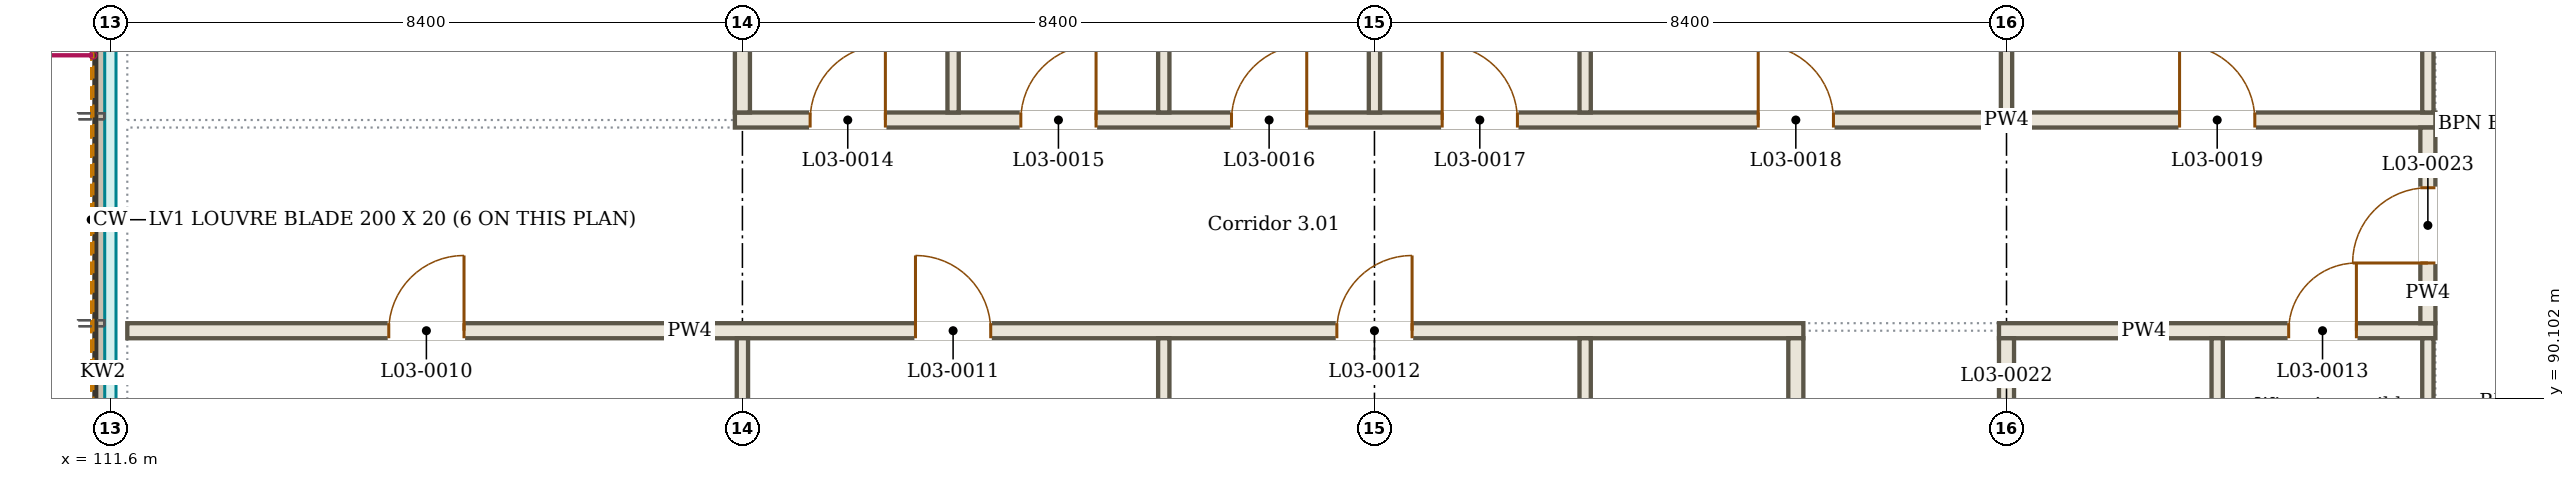
"""IFC4 building model, lengths in metres.
Left out: names, types, materials, properties, quantities, classifications, styles, units other than length and angle.
Written with IfcOpenShell. Run it as: python <this file> out.ifc"""

import sys

from ifc_helpers import new_model, si_unit, direction, frame, frame_2d, origin, place, context, subcontext, project, spatial, rectangle, extrude, element, fill, save


model = new_model("IFC4")
c1 = context("Model", 3, precision=1e-05, world=origin(), true_north=direction((0.0, 1.0)))
c2 = subcontext(c1, "Body", "Model", "MODEL_VIEW")
j1 = project(units=[si_unit("LENGTHUNIT", "METRE"), si_unit("PLANEANGLEUNIT", "RADIAN")], contexts=[c1])
p1 = place(None, origin())
s1 = spatial("IfcSite", under=j1, at=p1, CompositionType="ELEMENT")
p2 = place(p1, origin())
s2 = spatial("IfcBuilding", under=s1, at=p2, CompositionType="ELEMENT")
p3 = place(p2, frame((0.0, 0.0, 13.5)))
s3 = spatial("IfcBuildingStorey", under=s2, at=p3, CompositionType="ELEMENT", Elevation=13.5)
p4 = place(p3, frame((111.44, 88.35, 3.87), z_axis=(0.0, 0.0, 1.0), x_axis=(0.0, 1.0, 0.0)))
e1 = element("IfcWall", 1, at=p4, inside=s3, PredefinedType="SOLIDWALL", context=c2, shape_type="SweptSolid", body=[
    extrude(rectangle(XDim=8.25, YDim=0.13, at=frame_2d((4.125, 0.0))), origin(), (0.0, 0.0, 1.0), 0.63),
])
p5 = place(p3, frame((111.825, 91.0, 0.0), z_axis=(0.0, 0.0, 1.0), x_axis=(1.0, 0.0, 0.0)))
e2 = element("IfcWall", 2, at=p5, inside=s3, PredefinedType="PARTITIONING", context=c2, shape_type="SweptSolid", body=[
    extrude(rectangle(XDim=22.275, YDim=0.2, at=frame_2d((11.138, 0.0))), origin(), (0.0, 0.0, 1.0), 3.8),
])
p6 = place(p5, frame((3.475, 0.0, 0.0)))
e3 = element("IfcOpeningElement", 3, at=p6, cuts=e2, PredefinedType="OPENING", context=c2, shape_type="SweptSolid", body=[
    extrude(rectangle(XDim=1.0, YDim=2.1, at=frame_2d((0.5, 1.05))), frame((0.0, 0.11, 0.0), z_axis=(0.0, -1.0, 0.0), x_axis=(1.0, 0.0, 0.0)), (0.0, 0.0, 1.0), 0.22),
])
p7 = place(p5, frame((10.475, 0.0, 0.0)))
e4 = element("IfcOpeningElement", 4, at=p7, cuts=e2, PredefinedType="OPENING", context=c2, shape_type="SweptSolid", body=[
    extrude(rectangle(XDim=1.0, YDim=2.1, at=frame_2d((0.5, 1.05))), frame((0.0, 0.11, 0.0), z_axis=(0.0, -1.0, 0.0), x_axis=(1.0, 0.0, 0.0)), (0.0, 0.0, 1.0), 0.22),
])
p8 = place(p5, frame((16.075, 0.0, 0.0)))
e5 = element("IfcOpeningElement", 5, at=p8, cuts=e2, PredefinedType="OPENING", context=c2, shape_type="SweptSolid", body=[
    extrude(rectangle(XDim=1.0, YDim=2.1, at=frame_2d((0.5, 1.05))), frame((0.0, 0.11, 0.0), z_axis=(0.0, -1.0, 0.0), x_axis=(1.0, 0.0, 0.0)), (0.0, 0.0, 1.0), 0.22),
])
p9 = place(p3, frame((136.7, 91.0, 0.0), z_axis=(0.0, 0.0, 1.0), x_axis=(1.0, 0.0, 0.0)))
e6 = element("IfcWall", 6, at=p9, inside=s3, PredefinedType="PARTITIONING", context=c2, shape_type="SweptSolid", body=[
    extrude(rectangle(XDim=5.8, YDim=0.2, at=frame_2d((2.9, 0.0))), origin(), (0.0, 0.0, 1.0), 3.8),
])
p10 = place(p9, frame((3.85, 0.0, 0.0)))
e7 = element("IfcOpeningElement", 7, at=p10, cuts=e6, PredefinedType="OPENING", context=c2, shape_type="SweptSolid", body=[
    extrude(rectangle(XDim=0.9, YDim=2.1, at=frame_2d((0.45, 1.05))), frame((0.0, 0.11, 0.0), z_axis=(0.0, -1.0, 0.0), x_axis=(1.0, 0.0, 0.0)), (0.0, 0.0, 1.0), 0.22),
])
p11 = place(p3, frame((119.9, 93.8, 0.0), z_axis=(0.0, 0.0, 1.0), x_axis=(1.0, 0.0, 0.0)))
e8 = element("IfcWall", 8, at=p11, inside=s3, PredefinedType="PARTITIONING", context=c2, shape_type="SweptSolid", body=[
    extrude(rectangle(XDim=22.6, YDim=0.2, at=frame_2d((11.3, 0.0))), origin(), (0.0, 0.0, 1.0), 3.8),
])
p12 = place(p11, frame((1.0, 0.0, 0.0)))
e9 = element("IfcOpeningElement", 9, at=p12, cuts=e8, PredefinedType="OPENING", context=c2, shape_type="SweptSolid", body=[
    extrude(rectangle(XDim=1.0, YDim=2.1, at=frame_2d((0.5, 1.05))), frame((0.0, 0.11, 0.0), z_axis=(0.0, -1.0, 0.0), x_axis=(1.0, 0.0, 0.0)), (0.0, 0.0, 1.0), 0.22),
])
p13 = place(p11, frame((3.8, 0.0, 0.0)))
e10 = element("IfcOpeningElement", 10, at=p13, cuts=e8, PredefinedType="OPENING", context=c2, shape_type="SweptSolid", body=[
    extrude(rectangle(XDim=1.0, YDim=2.1, at=frame_2d((0.5, 1.05))), frame((0.0, 0.11, 0.0), z_axis=(0.0, -1.0, 0.0), x_axis=(1.0, 0.0, 0.0)), (0.0, 0.0, 1.0), 0.22),
])
p14 = place(p11, frame((6.6, 0.0, 0.0)))
e11 = element("IfcOpeningElement", 11, at=p14, cuts=e8, PredefinedType="OPENING", context=c2, shape_type="SweptSolid", body=[
    extrude(rectangle(XDim=1.0, YDim=2.1, at=frame_2d((0.5, 1.05))), frame((0.0, 0.11, 0.0), z_axis=(0.0, -1.0, 0.0), x_axis=(1.0, 0.0, 0.0)), (0.0, 0.0, 1.0), 0.22),
])
p15 = place(p11, frame((9.4, 0.0, 0.0)))
e12 = element("IfcOpeningElement", 12, at=p15, cuts=e8, PredefinedType="OPENING", context=c2, shape_type="SweptSolid", body=[
    extrude(rectangle(XDim=1.0, YDim=2.1, at=frame_2d((0.5, 1.05))), frame((0.0, 0.11, 0.0), z_axis=(0.0, -1.0, 0.0), x_axis=(1.0, 0.0, 0.0)), (0.0, 0.0, 1.0), 0.22),
])
p16 = place(p11, frame((13.6, 0.0, 0.0)))
e13 = element("IfcOpeningElement", 13, at=p16, cuts=e8, PredefinedType="OPENING", context=c2, shape_type="SweptSolid", body=[
    extrude(rectangle(XDim=1.0, YDim=2.1, at=frame_2d((0.5, 1.05))), frame((0.0, 0.11, 0.0), z_axis=(0.0, -1.0, 0.0), x_axis=(1.0, 0.0, 0.0)), (0.0, 0.0, 1.0), 0.22),
])
p17 = place(p11, frame((19.2, 0.0, 0.0)))
e14 = element("IfcOpeningElement", 14, at=p17, cuts=e8, PredefinedType="OPENING", context=c2, shape_type="SweptSolid", body=[
    extrude(rectangle(XDim=1.0, YDim=2.1, at=frame_2d((0.5, 1.05))), frame((0.0, 0.11, 0.0), z_axis=(0.0, -1.0, 0.0), x_axis=(1.0, 0.0, 0.0)), (0.0, 0.0, 1.0), 0.22),
])
p18 = place(p3, frame((120.0, 88.397, 0.0), z_axis=(0.0, 0.0, 1.0), x_axis=(0.0, 1.0, 0.0)))
e15 = element("IfcWall", 15, at=p18, inside=s3, PredefinedType="PARTITIONING", context=c2, shape_type="SweptSolid", body=[
    extrude(rectangle(XDim=2.502, YDim=0.15, at=frame_2d((1.251, 0.0))), origin(), (0.0, 0.0, 1.0), 3.8),
])
p19 = place(p3, frame((120.0, 93.9, 0.0), z_axis=(0.0, 0.0, 1.0), x_axis=(0.0, 1.0, 0.0)))
e16 = element("IfcWall", 16, at=p19, inside=s3, PredefinedType="PARTITIONING", context=c2, shape_type="SweptSolid", body=[
    extrude(rectangle(XDim=2.7, YDim=0.2, at=frame_2d((1.35, 0.0))), origin(), (0.0, 0.0, 1.0), 3.8),
])
for number, where, z_axis, x_axis in (
    (17, (122.8, 93.9, 0.0), (0.0, 0.0, 1.0), (0.0, 1.0, 0.0)),
    (18, (125.6, 80.025, 0.0), (0.0, 0.0, 1.0), (0.0, 1.0, 0.0)),
    (19, (125.6, 93.9, 0.0), (0.0, 0.0, 1.0), (0.0, 1.0, 0.0)),
):
    element("IfcWall", number, at=place(p3, frame(where, z_axis=z_axis, x_axis=x_axis)), inside=s3, PredefinedType="PARTITIONING", context=c2, shape_type="SweptSolid", body=[
        extrude(rectangle(XDim=10.875, YDim=0.15, at=frame_2d((5.438, 0.0))), origin(), (0.0, 0.0, 1.0), 3.8),
    ])
p20 = place(p3, frame((128.4, 93.9, 0.0), z_axis=(0.0, 0.0, 1.0), x_axis=(0.0, 1.0, 0.0)))
e20 = element("IfcWall", 20, at=p20, inside=s3, PredefinedType="PARTITIONING", context=c2, shape_type="SweptSolid", body=[
    extrude(rectangle(XDim=2.503, YDim=0.15, at=frame_2d((1.251, 0.0))), origin(), (0.0, 0.0, 1.0), 3.8),
])
for number, where, z_axis, x_axis in (
    (21, (131.2, 80.025, 0.0), (0.0, 0.0, 1.0), (0.0, 1.0, 0.0)),
    (22, (131.2, 93.9, 0.0), (0.0, 0.0, 1.0), (0.0, 1.0, 0.0)),
):
    element("IfcWall", number, at=place(p3, frame(where, z_axis=z_axis, x_axis=x_axis)), inside=s3, PredefinedType="PARTITIONING", context=c2, shape_type="SweptSolid", body=[
        extrude(rectangle(XDim=10.875, YDim=0.15, at=frame_2d((5.438, 0.0))), origin(), (0.0, 0.0, 1.0), 3.8),
    ])
p21 = place(p3, frame((134.0, 82.3, 0.0), z_axis=(0.0, 0.0, 1.0), x_axis=(0.0, 1.0, 0.0)))
e23 = element("IfcWall", 23, at=p21, inside=s3, PredefinedType="PARTITIONING", context=c2, shape_type="SweptSolid", body=[
    extrude(rectangle(XDim=8.6, YDim=0.2, at=frame_2d((4.3, 0.0))), origin(), (0.0, 0.0, 1.0), 3.8),
])
p22 = place(p21, frame((3.8, 0.0, 0.0)))
e24 = element("IfcOpeningElement", 24, at=p22, cuts=e23, PredefinedType="OPENING", context=c2, shape_type="SweptSolid", body=[
    extrude(rectangle(XDim=1.0, YDim=2.1, at=frame_2d((0.5, 1.05))), frame((0.0, 0.11, 0.0), z_axis=(0.0, -1.0, 0.0), x_axis=(1.0, 0.0, 0.0)), (0.0, 0.0, 1.0), 0.22),
])
p23 = place(p3, frame((136.8, 88.2, 0.0), z_axis=(0.0, 0.0, 1.0), x_axis=(0.0, 1.0, 0.0)))
e25 = element("IfcWall", 25, at=p23, inside=s3, PredefinedType="PARTITIONING", context=c2, shape_type="SweptSolid", body=[
    extrude(rectangle(XDim=2.7, YDim=0.2, at=frame_2d((1.35, 0.0))), origin(), (0.0, 0.0, 1.0), 3.8),
])
p24 = place(p23, frame((0.95, 0.0, 0.0)))
e26 = element("IfcOpeningElement", 26, at=p24, cuts=e25, PredefinedType="OPENING", context=c2, shape_type="SweptSolid", body=[
    extrude(rectangle(XDim=0.9, YDim=2.1, at=frame_2d((0.45, 1.05))), frame((0.0, 0.11, 0.0), z_axis=(0.0, -1.0, 0.0), x_axis=(1.0, 0.0, 0.0)), (0.0, 0.0, 1.0), 0.22),
])
p25 = place(p3, frame((136.8, 93.9, 0.0), z_axis=(0.0, 0.0, 1.0), x_axis=(0.0, 1.0, 0.0)))
e27 = element("IfcWall", 27, at=p25, inside=s3, PredefinedType="PARTITIONING", context=c2, shape_type="SweptSolid", body=[
    extrude(rectangle(XDim=2.503, YDim=0.15, at=frame_2d((1.251, 0.0))), origin(), (0.0, 0.0, 1.0), 3.8),
])
for number, where, z_axis, x_axis in (
    (28, (139.6, 88.2, 0.0), (0.0, 0.0, 1.0), (0.0, 1.0, 0.0)),
    (29, (142.4, 88.2, 0.0), (0.0, 0.0, 1.0), (0.0, 1.0, 0.0)),
):
    element("IfcWall", number, at=place(p3, frame(where, z_axis=z_axis, x_axis=x_axis)), inside=s3, PredefinedType="PARTITIONING", context=c2, shape_type="SweptSolid", body=[
        extrude(rectangle(XDim=2.7, YDim=0.15, at=frame_2d((1.35, 0.0))), origin(), (0.0, 0.0, 1.0), 3.95),
    ])
p26 = place(p3, frame((142.4, 91.1, 0.0), z_axis=(0.0, 0.0, 1.0), x_axis=(0.0, 1.0, 0.0)))
e30 = element("IfcWall", 30, at=p26, inside=s3, PredefinedType="PARTITIONING", context=c2, shape_type="SweptSolid", body=[
    extrude(rectangle(XDim=2.6, YDim=0.2, at=frame_2d((1.3, 0.0))), origin(), (0.0, 0.0, 1.0), 3.95),
])
p27 = place(p26, frame((0.8, 0.0, 0.0)))
e31 = element("IfcOpeningElement", 31, at=p27, cuts=e30, PredefinedType="OPENING", context=c2, shape_type="SweptSolid", body=[
    extrude(rectangle(XDim=1.0, YDim=2.1, at=frame_2d((0.5, 1.05))), frame((0.0, 0.11, 0.0), z_axis=(0.0, -1.0, 0.0), x_axis=(1.0, 0.0, 0.0)), (0.0, 0.0, 1.0), 0.22),
])
p28 = place(p3, frame((142.4, 93.9, 0.0), z_axis=(0.0, 0.0, 1.0), x_axis=(0.0, 1.0, 0.0)))
e32 = element("IfcWall", 32, at=p28, inside=s3, PredefinedType="PARTITIONING", context=c2, shape_type="SweptSolid", body=[
    extrude(rectangle(XDim=10.875, YDim=0.15, at=frame_2d((5.438, 0.0))), origin(), (0.0, 0.0, 1.0), 3.8),
])
p29 = place(p3, frame((111.5, 88.4, 0.0), z_axis=(0.0, 0.0, 1.0), x_axis=(0.0, 1.0, 0.0)))
e33 = element("IfcWall", 33, at=p29, inside=s3, PredefinedType="SOLIDWALL", context=c2, shape_type="SweptSolid", body=[
    extrude(rectangle(XDim=8.2, YDim=0.2, at=frame_2d((4.1, 0.0))), origin(), (0.0, 0.0, 1.0), 3.0),
])
p30 = place(p6, origin())
e34 = element("IfcDoor", 34, at=p30, inside=s3, OperationType="SINGLE_SWING_RIGHT", PredefinedType="DOOR", context=c2, shape_type="SweptSolid", body=[
    extrude(rectangle(XDim=1.0, YDim=2.1, at=frame_2d((0.5, 1.05))), frame((0.0, 0.025, 0.0), z_axis=(0.0, -1.0, 0.0), x_axis=(1.0, 0.0, 0.0)), (0.0, 0.0, 1.0), 0.05),
])
fill(e3, e34)
p31 = place(p7, origin())
e35 = element("IfcDoor", 35, at=p31, inside=s3, OperationType="SINGLE_SWING_LEFT", PredefinedType="DOOR", context=c2, shape_type="SweptSolid", body=[
    extrude(rectangle(XDim=1.0, YDim=2.1, at=frame_2d((0.5, 1.05))), frame((0.0, 0.025, 0.0), z_axis=(0.0, -1.0, 0.0), x_axis=(1.0, 0.0, 0.0)), (0.0, 0.0, 1.0), 0.05),
])
fill(e4, e35)
p32 = place(p8, origin())
e36 = element("IfcDoor", 36, at=p32, inside=s3, OperationType="SINGLE_SWING_RIGHT", PredefinedType="DOOR", context=c2, shape_type="SweptSolid", body=[
    extrude(rectangle(XDim=1.0, YDim=2.1, at=frame_2d((0.5, 1.05))), frame((0.0, 0.025, 0.0), z_axis=(0.0, -1.0, 0.0), x_axis=(1.0, 0.0, 0.0)), (0.0, 0.0, 1.0), 0.05),
])
fill(e5, e36)
p33 = place(p10, origin())
e37 = element("IfcDoor", 37, at=p33, inside=s3, OperationType="SINGLE_SWING_RIGHT", PredefinedType="DOOR", context=c2, shape_type="SweptSolid", body=[
    extrude(rectangle(XDim=0.9, YDim=2.1, at=frame_2d((0.45, 1.05))), frame((0.0, 0.025, 0.0), z_axis=(0.0, -1.0, 0.0), x_axis=(1.0, 0.0, 0.0)), (0.0, 0.0, 1.0), 0.05),
])
fill(e7, e37)
p34 = place(p12, origin())
e38 = element("IfcDoor", 38, at=p34, inside=s3, OperationType="SINGLE_SWING_RIGHT", PredefinedType="DOOR", context=c2, shape_type="SweptSolid", body=[
    extrude(rectangle(XDim=1.0, YDim=2.1, at=frame_2d((0.5, 1.05))), frame((0.0, 0.025, 0.0), z_axis=(0.0, -1.0, 0.0), x_axis=(1.0, 0.0, 0.0)), (0.0, 0.0, 1.0), 0.05),
])
fill(e9, e38)
p35 = place(p13, origin())
e39 = element("IfcDoor", 39, at=p35, inside=s3, OperationType="SINGLE_SWING_RIGHT", PredefinedType="DOOR", context=c2, shape_type="SweptSolid", body=[
    extrude(rectangle(XDim=1.0, YDim=2.1, at=frame_2d((0.5, 1.05))), frame((0.0, 0.025, 0.0), z_axis=(0.0, -1.0, 0.0), x_axis=(1.0, 0.0, 0.0)), (0.0, 0.0, 1.0), 0.05),
])
fill(e10, e39)
p36 = place(p14, origin())
e40 = element("IfcDoor", 40, at=p36, inside=s3, OperationType="SINGLE_SWING_RIGHT", PredefinedType="DOOR", context=c2, shape_type="SweptSolid", body=[
    extrude(rectangle(XDim=1.0, YDim=2.1, at=frame_2d((0.5, 1.05))), frame((0.0, 0.025, 0.0), z_axis=(0.0, -1.0, 0.0), x_axis=(1.0, 0.0, 0.0)), (0.0, 0.0, 1.0), 0.05),
])
fill(e11, e40)
p37 = place(p15, origin())
e41 = element("IfcDoor", 41, at=p37, inside=s3, OperationType="SINGLE_SWING_LEFT", PredefinedType="DOOR", context=c2, shape_type="SweptSolid", body=[
    extrude(rectangle(XDim=1.0, YDim=2.1, at=frame_2d((0.5, 1.05))), frame((0.0, 0.025, 0.0), z_axis=(0.0, -1.0, 0.0), x_axis=(1.0, 0.0, 0.0)), (0.0, 0.0, 1.0), 0.05),
])
fill(e12, e41)
p38 = place(p16, origin())
e42 = element("IfcDoor", 42, at=p38, inside=s3, OperationType="SINGLE_SWING_LEFT", PredefinedType="DOOR", context=c2, shape_type="SweptSolid", body=[
    extrude(rectangle(XDim=1.0, YDim=2.1, at=frame_2d((0.5, 1.05))), frame((0.0, 0.025, 0.0), z_axis=(0.0, -1.0, 0.0), x_axis=(1.0, 0.0, 0.0)), (0.0, 0.0, 1.0), 0.05),
])
fill(e13, e42)
p39 = place(p17, origin())
e43 = element("IfcDoor", 43, at=p39, inside=s3, OperationType="SINGLE_SWING_LEFT", PredefinedType="DOOR", context=c2, shape_type="SweptSolid", body=[
    extrude(rectangle(XDim=1.0, YDim=2.1, at=frame_2d((0.5, 1.05))), frame((0.0, 0.025, 0.0), z_axis=(0.0, -1.0, 0.0), x_axis=(1.0, 0.0, 0.0)), (0.0, 0.0, 1.0), 0.05),
])
fill(e14, e43)
p40 = place(p27, origin())
e44 = element("IfcDoor", 44, at=p40, inside=s3, OperationType="SINGLE_SWING_LEFT", PredefinedType="DOOR", context=c2, shape_type="SweptSolid", body=[
    extrude(rectangle(XDim=1.0, YDim=2.1, at=frame_2d((0.5, 1.05))), frame((0.0, 0.025, 0.0), z_axis=(0.0, -1.0, 0.0), x_axis=(1.0, 0.0, 0.0)), (0.0, 0.0, 1.0), 0.05),
])
fill(e31, e44)
save(model, sys.argv[1])
